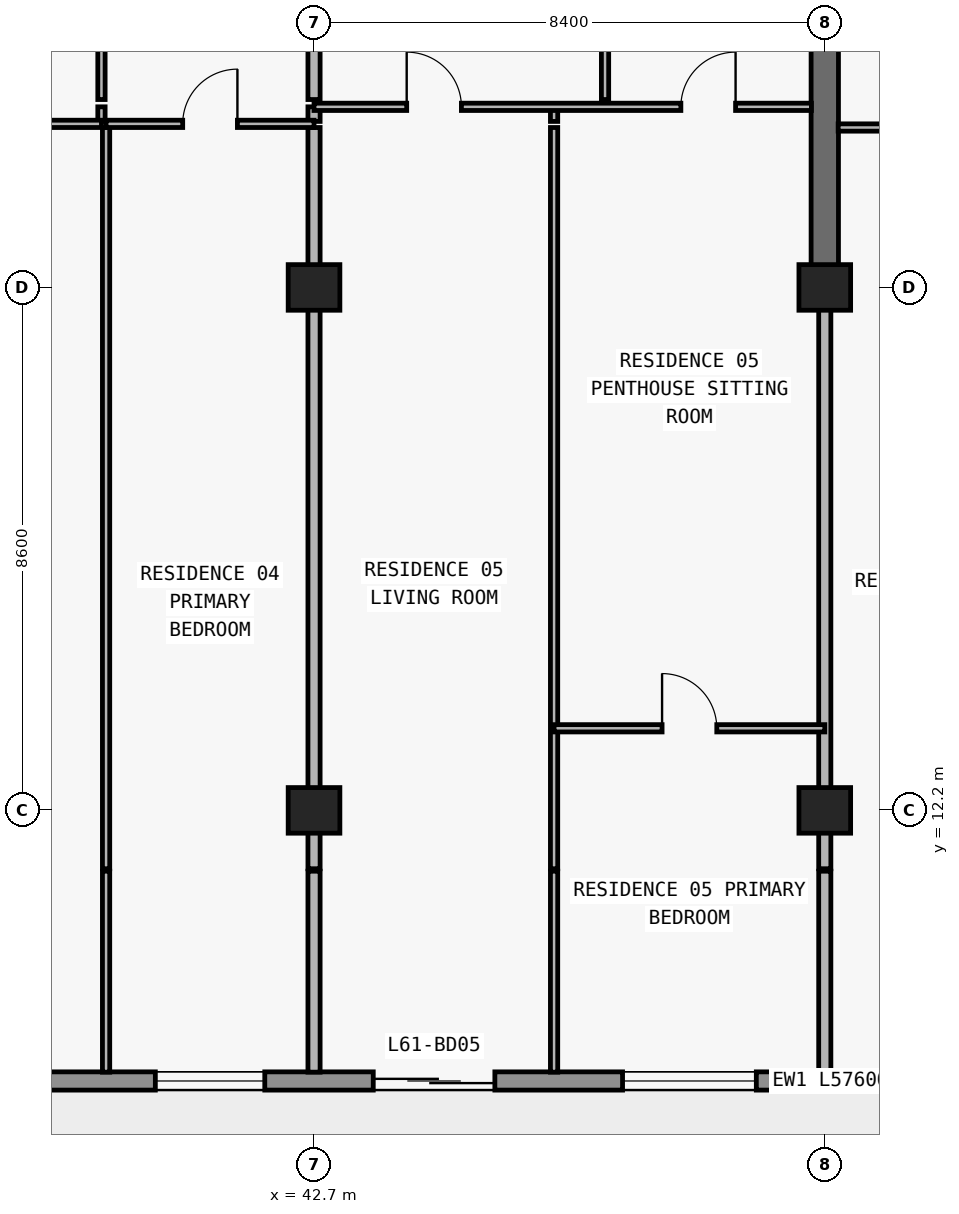
"""IFC4 building model, lengths in metres.
Left out: names, types, materials, properties, quantities, classifications, styles, units other than length and angle.
Written with IfcOpenShell. Run it as: python <this file> out.ifc"""

import sys

from ifc_helpers import new_model, si_unit, direction, frame, frame_2d, origin, origin_2d, place, context, subcontext, project, spatial, rectangle, extrude, element, fill, save


model = new_model("IFC4")
c1 = context("Model", 3, precision=1e-05, world=origin(), true_north=direction((0.0, 1.0)))
c2 = subcontext(c1, "Body", "Model", "MODEL_VIEW")
j1 = project(units=[si_unit("LENGTHUNIT", "METRE"), si_unit("PLANEANGLEUNIT", "RADIAN")], contexts=[c1])
p1 = place(None, origin())
s1 = spatial("IfcSite", under=j1, at=p1, CompositionType="ELEMENT")
p2 = place(p1, origin())
s2 = spatial("IfcBuilding", under=s1, at=p2, CompositionType="ELEMENT")
p3 = place(p2, frame((0.0, 0.0, 218.1)))
s3 = spatial("IfcBuildingStorey", under=s2, at=p3, CompositionType="ELEMENT", Elevation=218.1)
for number, where, z_axis, x_axis in (
    (1, (42.7, 12.2, 0.0), (0.0, 0.0, 1.0), (1.0, 0.0, 0.0)),
    (2, (51.1, 12.2, 0.0), (0.0, 0.0, 1.0), (1.0, 0.0, 0.0)),
    (3, (42.7, 20.8, 0.0), (0.0, 0.0, 1.0), (1.0, 0.0, 0.0)),
    (4, (51.1, 20.8, 0.0), (0.0, 0.0, 1.0), (1.0, 0.0, 0.0)),
):
    element("IfcColumn", number, at=place(p3, frame(where, z_axis=z_axis, x_axis=x_axis)), inside=s3, PredefinedType="COLUMN", context=c2, shape_type="SweptSolid", body=[
        extrude(rectangle(XDim=0.85, YDim=0.75, at=origin_2d()), origin(), (0.0, 0.0, 1.0), 3.0),
    ])
p4 = place(p3, frame((51.1, 20.8, 0.0), z_axis=(0.0, 0.0, 1.0), x_axis=(0.0, 1.0, 0.0)))
e5 = element("IfcWall", 5, at=p4, inside=s3, PredefinedType="SHEAR", context=c2, shape_type="SweptSolid", body=[
    extrude(rectangle(XDim=8.6, YDim=0.45, at=frame_2d((4.3, 0.0))), origin(), (0.0, 0.0, 1.0), 3.0),
])
p5 = place(p3, frame((67.7, 7.75, 0.0), z_axis=(0.0, 0.0, 1.0), x_axis=(-1.0, 0.0, 0.0)))
e6 = element("IfcWall", 6, at=p5, inside=s3, PredefinedType="STANDARD", context=c2, shape_type="SweptSolid", body=[
    extrude(rectangle(XDim=57.6, YDim=0.3, at=frame_2d((28.8, 0.0))), origin(), (0.0, 0.0, 1.0), 3.0),
])
p6 = place(p5, frame((54.673, 0.0, 0.0)))
e7 = element("IfcOpeningElement", 7, at=p6, cuts=e6, PredefinedType="OPENING", context=c2, shape_type="SweptSolid", body=[
    extrude(rectangle(XDim=2.0, YDim=2.3, at=frame_2d((1.0, 1.15))), frame((0.0, 0.16, 0.0), z_axis=(0.0, -1.0, 0.0), x_axis=(1.0, 0.0, 0.0)), (0.0, 0.0, 1.0), 0.32),
])
p7 = place(p5, frame((50.473, 0.0, 0.85)))
e8 = element("IfcOpeningElement", 8, at=p7, cuts=e6, PredefinedType="OPENING", context=c2, shape_type="SweptSolid", body=[
    extrude(rectangle(XDim=2.2, YDim=1.55, at=frame_2d((1.1, 0.775))), frame((0.0, 0.16, 0.0), z_axis=(0.0, -1.0, 0.0), x_axis=(1.0, 0.0, 0.0)), (0.0, 0.0, 1.0), 0.32),
])
p8 = place(p5, frame((46.09, 0.0, 0.0)))
e9 = element("IfcOpeningElement", 9, at=p8, cuts=e6, PredefinedType="OPENING", context=c2, shape_type="SweptSolid", body=[
    extrude(rectangle(XDim=2.0, YDim=2.3, at=frame_2d((1.0, 1.15))), frame((0.0, 0.16, 0.0), z_axis=(0.0, -1.0, 0.0), x_axis=(1.0, 0.0, 0.0)), (0.0, 0.0, 1.0), 0.32),
])
p9 = place(p5, frame((41.99, 0.0, 0.85)))
e10 = element("IfcOpeningElement", 10, at=p9, cuts=e6, PredefinedType="OPENING", context=c2, shape_type="SweptSolid", body=[
    extrude(rectangle(XDim=1.8, YDim=1.55, at=frame_2d((0.9, 0.775))), frame((0.0, 0.16, 0.0), z_axis=(0.0, -1.0, 0.0), x_axis=(1.0, 0.0, 0.0)), (0.0, 0.0, 1.0), 0.32),
])
p10 = place(p5, frame((38.026, 0.0, 0.0)))
e11 = element("IfcOpeningElement", 11, at=p10, cuts=e6, PredefinedType="OPENING", context=c2, shape_type="SweptSolid", body=[
    extrude(rectangle(XDim=2.0, YDim=2.3, at=frame_2d((1.0, 1.15))), frame((0.0, 0.16, 0.0), z_axis=(0.0, -1.0, 0.0), x_axis=(1.0, 0.0, 0.0)), (0.0, 0.0, 1.0), 0.32),
])
p11 = place(p5, frame((33.726, 0.0, 0.85)))
e12 = element("IfcOpeningElement", 12, at=p11, cuts=e6, PredefinedType="OPENING", context=c2, shape_type="SweptSolid", body=[
    extrude(rectangle(XDim=2.2, YDim=1.55, at=frame_2d((1.1, 0.775))), frame((0.0, 0.16, 0.0), z_axis=(0.0, -1.0, 0.0), x_axis=(1.0, 0.0, 0.0)), (0.0, 0.0, 1.0), 0.32),
])
p12 = place(p5, frame((29.51, 0.0, 0.0)))
e13 = element("IfcOpeningElement", 13, at=p12, cuts=e6, PredefinedType="OPENING", context=c2, shape_type="SweptSolid", body=[
    extrude(rectangle(XDim=2.0, YDim=2.3, at=frame_2d((1.0, 1.15))), frame((0.0, 0.16, 0.0), z_axis=(0.0, -1.0, 0.0), x_axis=(1.0, 0.0, 0.0)), (0.0, 0.0, 1.0), 0.32),
])
p13 = place(p5, frame((25.81, 0.0, 0.85)))
e14 = element("IfcOpeningElement", 14, at=p13, cuts=e6, PredefinedType="OPENING", context=c2, shape_type="SweptSolid", body=[
    extrude(rectangle(XDim=1.8, YDim=1.55, at=frame_2d((0.9, 0.775))), frame((0.0, 0.16, 0.0), z_axis=(0.0, -1.0, 0.0), x_axis=(1.0, 0.0, 0.0)), (0.0, 0.0, 1.0), 0.32),
])
p14 = place(p5, frame((22.026, 0.0, 0.0)))
e15 = element("IfcOpeningElement", 15, at=p14, cuts=e6, PredefinedType="OPENING", context=c2, shape_type="SweptSolid", body=[
    extrude(rectangle(XDim=2.0, YDim=2.3, at=frame_2d((1.0, 1.15))), frame((0.0, 0.16, 0.0), z_axis=(0.0, -1.0, 0.0), x_axis=(1.0, 0.0, 0.0)), (0.0, 0.0, 1.0), 0.32),
])
p15 = place(p5, frame((17.726, 0.0, 0.85)))
e16 = element("IfcOpeningElement", 16, at=p15, cuts=e6, PredefinedType="OPENING", context=c2, shape_type="SweptSolid", body=[
    extrude(rectangle(XDim=2.2, YDim=1.55, at=frame_2d((1.1, 0.775))), frame((0.0, 0.16, 0.0), z_axis=(0.0, -1.0, 0.0), x_axis=(1.0, 0.0, 0.0)), (0.0, 0.0, 1.0), 0.32),
])
p16 = place(p5, frame((13.29, 0.0, 0.0)))
e17 = element("IfcOpeningElement", 17, at=p16, cuts=e6, PredefinedType="OPENING", context=c2, shape_type="SweptSolid", body=[
    extrude(rectangle(XDim=2.0, YDim=2.3, at=frame_2d((1.0, 1.15))), frame((0.0, 0.16, 0.0), z_axis=(0.0, -1.0, 0.0), x_axis=(1.0, 0.0, 0.0)), (0.0, 0.0, 1.0), 0.32),
])
p17 = place(p5, frame((9.19, 0.0, 0.85)))
e18 = element("IfcOpeningElement", 18, at=p17, cuts=e6, PredefinedType="OPENING", context=c2, shape_type="SweptSolid", body=[
    extrude(rectangle(XDim=1.8, YDim=1.55, at=frame_2d((0.9, 0.775))), frame((0.0, 0.16, 0.0), z_axis=(0.0, -1.0, 0.0), x_axis=(1.0, 0.0, 0.0)), (0.0, 0.0, 1.0), 0.32),
])
p18 = place(p5, frame((5.273, 0.0, 0.0)))
e19 = element("IfcOpeningElement", 19, at=p18, cuts=e6, PredefinedType="OPENING", context=c2, shape_type="SweptSolid", body=[
    extrude(rectangle(XDim=2.0, YDim=2.3, at=frame_2d((1.0, 1.15))), frame((0.0, 0.16, 0.0), z_axis=(0.0, -1.0, 0.0), x_axis=(1.0, 0.0, 0.0)), (0.0, 0.0, 1.0), 0.32),
])
p19 = place(p5, frame((1.073, 0.0, 0.85)))
e20 = element("IfcOpeningElement", 20, at=p19, cuts=e6, PredefinedType="OPENING", context=c2, shape_type="SweptSolid", body=[
    extrude(rectangle(XDim=2.2, YDim=1.55, at=frame_2d((1.1, 0.775))), frame((0.0, 0.16, 0.0), z_axis=(0.0, -1.0, 0.0), x_axis=(1.0, 0.0, 0.0)), (0.0, 0.0, 1.0), 0.32),
])
p20 = place(p3, frame((39.204, 23.53, 0.0), z_axis=(0.0, 0.0, 1.0), x_axis=(0.0, 1.0, 0.0)))
e21 = element("IfcWall", 21, at=p20, inside=s3, PredefinedType="PARTITIONING", context=c2, shape_type="SweptSolid", body=[
    extrude(rectangle(XDim=0.24, YDim=0.12, at=frame_2d((0.12, 0.0))), origin(), (0.0, 0.0, 1.0), 3.0),
])
p21 = place(p3, frame((39.204, 23.89, 0.0), z_axis=(0.0, 0.0, 1.0), x_axis=(0.0, 1.0, 0.0)))
e22 = element("IfcWall", 22, at=p21, inside=s3, PredefinedType="PARTITIONING", context=c2, shape_type="SweptSolid", body=[
    extrude(rectangle(XDim=4.69, YDim=0.12, at=frame_2d((2.345, 0.0))), origin(), (0.0, 0.0, 1.0), 3.0),
])
p22 = place(p21, frame((1.895, 0.0, 0.0)))
e23 = element("IfcOpeningElement", 23, at=p22, cuts=e22, PredefinedType="OPENING", context=c2, shape_type="SweptSolid", body=[
    extrude(rectangle(XDim=0.9, YDim=2.15, at=frame_2d((0.45, 1.075))), frame((0.0, 0.07, 0.0), z_axis=(0.0, -1.0, 0.0), x_axis=(1.0, 0.0, 0.0)), (0.0, 0.0, 1.0), 0.14),
])
p23 = place(p3, frame((39.28, 7.895, 0.0), z_axis=(0.0, 0.0, 1.0), x_axis=(0.0, 1.0, 0.0)))
e24 = element("IfcWall", 24, at=p23, inside=s3, PredefinedType="PARTITIONING", context=c2, shape_type="SweptSolid", body=[
    extrude(rectangle(XDim=3.305, YDim=0.12, at=frame_2d((1.652, 0.0))), origin(), (0.0, 0.0, 1.0), 3.0),
])
p24 = place(p3, frame((39.28, 11.24, 0.0), z_axis=(0.0, 0.0, 1.0), x_axis=(0.0, 1.0, 0.0)))
e25 = element("IfcWall", 25, at=p24, inside=s3, PredefinedType="PARTITIONING", context=c2, shape_type="SweptSolid", body=[
    extrude(rectangle(XDim=12.19, YDim=0.12, at=frame_2d((6.095, 0.0))), origin(), (0.0, 0.0, 1.0), 3.0),
])
p25 = place(p3, frame((42.7, 7.895, 0.0), z_axis=(0.0, 0.0, 1.0), x_axis=(0.0, 1.0, 0.0)))
e26 = element("IfcWall", 26, at=p25, inside=s3, PredefinedType="PARTITIONING", context=c2, shape_type="SweptSolid", body=[
    extrude(rectangle(XDim=3.305, YDim=0.2, at=frame_2d((1.652, 0.0))), origin(), (0.0, 0.0, 1.0), 3.0),
])
p26 = place(p3, frame((42.7, 11.24, 0.0), z_axis=(0.0, 0.0, 1.0), x_axis=(0.0, 1.0, 0.0)))
e27 = element("IfcWall", 27, at=p26, inside=s3, PredefinedType="PARTITIONING", context=c2, shape_type="SweptSolid", body=[
    extrude(rectangle(XDim=12.19, YDim=0.2, at=frame_2d((6.095, 0.0))), origin(), (0.0, 0.0, 1.0), 2.213),
])
p27 = place(p3, frame((42.7, 23.53, 0.0), z_axis=(0.0, 0.0, 1.0), x_axis=(0.0, 1.0, 0.0)))
e28 = element("IfcWall", 28, at=p27, inside=s3, PredefinedType="PARTITIONING", context=c2, shape_type="SweptSolid", body=[
    extrude(rectangle(XDim=0.24, YDim=0.2, at=frame_2d((0.12, 0.0))), origin(), (0.0, 0.0, 1.0), 2.213),
])
p28 = place(p3, frame((42.7, 23.89, 0.0), z_axis=(0.0, 0.0, 1.0), x_axis=(0.0, 1.0, 0.0)))
e29 = element("IfcWall", 29, at=p28, inside=s3, PredefinedType="PARTITIONING", context=c2, shape_type="SweptSolid", body=[
    extrude(rectangle(XDim=4.69, YDim=0.2, at=frame_2d((2.345, 0.0))), origin(), (0.0, 0.0, 1.0), 2.213),
])
p29 = place(p3, frame((46.648, 7.895, 0.0), z_axis=(0.0, 0.0, 1.0), x_axis=(0.0, 1.0, 0.0)))
e30 = element("IfcWall", 30, at=p29, inside=s3, PredefinedType="PARTITIONING", context=c2, shape_type="SweptSolid", body=[
    extrude(rectangle(XDim=3.305, YDim=0.12, at=frame_2d((1.652, 0.0))), origin(), (0.0, 0.0, 1.0), 3.0),
])
p30 = place(p3, frame((46.648, 11.24, 0.0), z_axis=(0.0, 0.0, 1.0), x_axis=(0.0, 1.0, 0.0)))
e31 = element("IfcWall", 31, at=p30, inside=s3, PredefinedType="PARTITIONING", context=c2, shape_type="SweptSolid", body=[
    extrude(rectangle(XDim=12.19, YDim=0.12, at=frame_2d((6.095, 0.0))), origin(), (0.0, 0.0, 1.0), 3.0),
])
p31 = place(p3, frame((46.648, 23.53, 0.0), z_axis=(0.0, 0.0, 1.0), x_axis=(0.0, 1.0, 0.0)))
e32 = element("IfcWall", 32, at=p31, inside=s3, PredefinedType="PARTITIONING", context=c2, shape_type="SweptSolid", body=[
    extrude(rectangle(XDim=0.24, YDim=0.12, at=frame_2d((0.12, 0.0))), origin(), (0.0, 0.0, 1.0), 3.0),
])
p32 = place(p3, frame((47.486, 23.89, 0.0), z_axis=(0.0, 0.0, 1.0), x_axis=(0.0, 1.0, 0.0)))
e33 = element("IfcWall", 33, at=p32, inside=s3, PredefinedType="PARTITIONING", context=c2, shape_type="SweptSolid", body=[
    extrude(rectangle(XDim=4.69, YDim=0.12, at=frame_2d((2.345, 0.0))), origin(), (0.0, 0.0, 1.0), 3.0),
])
p33 = place(p32, frame((1.895, 0.0, 0.0)))
e34 = element("IfcOpeningElement", 34, at=p33, cuts=e33, PredefinedType="OPENING", context=c2, shape_type="SweptSolid", body=[
    extrude(rectangle(XDim=0.9, YDim=2.15, at=frame_2d((0.45, 1.075))), frame((0.0, 0.07, 0.0), z_axis=(0.0, -1.0, 0.0), x_axis=(1.0, 0.0, 0.0)), (0.0, 0.0, 1.0), 0.14),
])
p34 = place(p3, frame((51.1, 7.895, 0.0), z_axis=(0.0, 0.0, 1.0), x_axis=(0.0, 1.0, 0.0)))
e35 = element("IfcWall", 35, at=p34, inside=s3, PredefinedType="PARTITIONING", context=c2, shape_type="SweptSolid", body=[
    extrude(rectangle(XDim=3.305, YDim=0.2, at=frame_2d((1.652, 0.0))), origin(), (0.0, 0.0, 1.0), 3.0),
])
p35 = place(p3, frame((51.1, 11.24, 0.0), z_axis=(0.0, 0.0, 1.0), x_axis=(0.0, 1.0, 0.0)))
e36 = element("IfcWall", 36, at=p35, inside=s3, PredefinedType="PARTITIONING", context=c2, shape_type="SweptSolid", body=[
    extrude(rectangle(XDim=9.555, YDim=0.2, at=frame_2d((4.777, 0.0))), origin(), (0.0, 0.0, 1.0), 2.213),
])
p36 = place(p3, frame((46.648, 13.55, 0.0), z_axis=(0.0, 0.0, 1.0), x_axis=(1.0, 0.0, 0.0)))
e37 = element("IfcWall", 37, at=p36, inside=s3, PredefinedType="PARTITIONING", context=c2, shape_type="SweptSolid", body=[
    extrude(rectangle(XDim=4.452, YDim=0.12, at=frame_2d((2.226, 0.0))), origin(), (0.0, 0.0, 1.0), 3.0),
])
p37 = place(p36, frame((1.776, 0.0, 0.0)))
e38 = element("IfcOpeningElement", 38, at=p37, cuts=e37, PredefinedType="OPENING", context=c2, shape_type="SweptSolid", body=[
    extrude(rectangle(XDim=0.9, YDim=2.15, at=frame_2d((0.45, 1.075))), frame((0.0, 0.07, 0.0), z_axis=(0.0, -1.0, 0.0), x_axis=(1.0, 0.0, 0.0)), (0.0, 0.0, 1.0), 0.14),
])
p38 = place(p3, frame((51.32, 23.43, 0.0), z_axis=(0.0, 0.0, 1.0), x_axis=(1.0, 0.0, 0.0)))
e39 = element("IfcWall", 39, at=p38, inside=s3, PredefinedType="PARTITIONING", context=c2, shape_type="SweptSolid", body=[
    extrude(rectangle(XDim=8.18, YDim=0.12, at=frame_2d((4.09, 0.0))), origin(), (0.0, 0.0, 1.0), 3.0),
])
p39 = place(p38, frame((1.583, 0.0, 0.0)))
e40 = element("IfcOpeningElement", 40, at=p39, cuts=e39, PredefinedType="OPENING", context=c2, shape_type="SweptSolid", body=[
    extrude(rectangle(XDim=0.9, YDim=2.15, at=frame_2d((0.45, 1.075))), frame((0.0, 0.07, 0.0), z_axis=(0.0, -1.0, 0.0), x_axis=(1.0, 0.0, 0.0)), (0.0, 0.0, 1.0), 0.14),
])
p40 = place(p38, frame((5.84, 0.0, 0.0)))
e41 = element("IfcOpeningElement", 41, at=p40, cuts=e39, PredefinedType="OPENING", context=c2, shape_type="SweptSolid", body=[
    extrude(rectangle(XDim=0.9, YDim=2.15, at=frame_2d((0.45, 1.075))), frame((0.0, 0.07, 0.0), z_axis=(0.0, -1.0, 0.0), x_axis=(1.0, 0.0, 0.0)), (0.0, 0.0, 1.0), 0.14),
])
p41 = place(p3, frame((35.1, 23.49, 0.0), z_axis=(0.0, 0.0, 1.0), x_axis=(1.0, 0.0, 0.0)))
e42 = element("IfcWall", 42, at=p41, inside=s3, PredefinedType="PARTITIONING", context=c2, shape_type="SweptSolid", body=[
    extrude(rectangle(XDim=4.104, YDim=0.12, at=frame_2d((2.052, 0.0))), origin(), (0.0, 0.0, 1.0), 3.0),
])
p42 = place(p41, frame((1.602, 0.0, 0.0)))
e43 = element("IfcOpeningElement", 43, at=p42, cuts=e42, PredefinedType="OPENING", context=c2, shape_type="SweptSolid", body=[
    extrude(rectangle(XDim=0.9, YDim=2.15, at=frame_2d((0.45, 1.075))), frame((0.0, 0.07, 0.0), z_axis=(0.0, -1.0, 0.0), x_axis=(1.0, 0.0, 0.0)), (0.0, 0.0, 1.0), 0.14),
])
p43 = place(p3, frame((39.28, 23.49, 0.0), z_axis=(0.0, 0.0, 1.0), x_axis=(1.0, 0.0, 0.0)))
e44 = element("IfcWall", 44, at=p43, inside=s3, PredefinedType="PARTITIONING", context=c2, shape_type="SweptSolid", body=[
    extrude(rectangle(XDim=3.42, YDim=0.12, at=frame_2d((1.71, 0.0))), origin(), (0.0, 0.0, 1.0), 3.0),
])
p44 = place(p43, frame((1.26, 0.0, 0.0)))
e45 = element("IfcOpeningElement", 45, at=p44, cuts=e44, PredefinedType="OPENING", context=c2, shape_type="SweptSolid", body=[
    extrude(rectangle(XDim=0.9, YDim=2.15, at=frame_2d((0.45, 1.075))), frame((0.0, 0.07, 0.0), z_axis=(0.0, -1.0, 0.0), x_axis=(1.0, 0.0, 0.0)), (0.0, 0.0, 1.0), 0.14),
])
p45 = place(p3, frame((42.7, 23.77, 0.0), z_axis=(0.0, 0.0, 1.0), x_axis=(1.0, 0.0, 0.0)))
e46 = element("IfcWall", 46, at=p45, inside=s3, PredefinedType="PARTITIONING", context=c2, shape_type="SweptSolid", body=[
    extrude(rectangle(XDim=8.18, YDim=0.12, at=frame_2d((4.09, 0.0))), origin(), (0.0, 0.0, 1.0), 3.0),
])
p46 = place(p45, frame((1.524, 0.0, 0.0)))
e47 = element("IfcOpeningElement", 47, at=p46, cuts=e46, PredefinedType="OPENING", context=c2, shape_type="SweptSolid", body=[
    extrude(rectangle(XDim=0.9, YDim=2.15, at=frame_2d((0.45, 1.075))), frame((0.0, 0.07, 0.0), z_axis=(0.0, -1.0, 0.0), x_axis=(1.0, 0.0, 0.0)), (0.0, 0.0, 1.0), 0.14),
])
p47 = place(p45, frame((6.033, 0.0, 0.0)))
e48 = element("IfcOpeningElement", 48, at=p47, cuts=e46, PredefinedType="OPENING", context=c2, shape_type="SweptSolid", body=[
    extrude(rectangle(XDim=0.9, YDim=2.15, at=frame_2d((0.45, 1.075))), frame((0.0, 0.07, 0.0), z_axis=(0.0, -1.0, 0.0), x_axis=(1.0, 0.0, 0.0)), (0.0, 0.0, 1.0), 0.14),
])
p48 = place(p13, origin())
e49 = element("IfcWindow", 49, at=p48, inside=s3, PartitioningType="SINGLE_PANEL", PredefinedType="WINDOW", context=c2, shape_type="SweptSolid", body=[
    extrude(rectangle(XDim=1.8, YDim=1.55, at=frame_2d((0.9, 0.775))), frame((0.0, 0.03, 0.0), z_axis=(0.0, -1.0, 0.0), x_axis=(1.0, 0.0, 0.0)), (0.0, 0.0, 1.0), 0.06),
])
fill(e14, e49)
p49 = place(p14, origin())
e50 = element("IfcDoor", 50, at=p49, inside=s3, OperationType="DOUBLE_DOOR_SLIDING", PredefinedType="DOOR", context=c2, shape_type="SweptSolid", body=[
    extrude(rectangle(XDim=2.0, YDim=2.3, at=frame_2d((1.0, 1.15))), frame((0.0, 0.025, 0.0), z_axis=(0.0, -1.0, 0.0), x_axis=(1.0, 0.0, 0.0)), (0.0, 0.0, 1.0), 0.05),
])
fill(e15, e50)
p50 = place(p15, origin())
e51 = element("IfcWindow", 51, at=p50, inside=s3, PartitioningType="SINGLE_PANEL", PredefinedType="WINDOW", context=c2, shape_type="SweptSolid", body=[
    extrude(rectangle(XDim=2.2, YDim=1.55, at=frame_2d((1.1, 0.775))), frame((0.0, 0.03, 0.0), z_axis=(0.0, -1.0, 0.0), x_axis=(1.0, 0.0, 0.0)), (0.0, 0.0, 1.0), 0.06),
])
fill(e16, e51)
p51 = place(p44, origin())
e52 = element("IfcDoor", 52, at=p51, inside=s3, OperationType="SINGLE_SWING_RIGHT", PredefinedType="DOOR", context=c2, shape_type="SweptSolid", body=[
    extrude(rectangle(XDim=0.9, YDim=2.15, at=frame_2d((0.45, 1.075))), frame((0.0, 0.025, 0.0), z_axis=(0.0, -1.0, 0.0), x_axis=(1.0, 0.0, 0.0)), (0.0, 0.0, 1.0), 0.05),
])
fill(e45, e52)
p52 = place(p46, origin())
e53 = element("IfcDoor", 53, at=p52, inside=s3, OperationType="SINGLE_SWING_LEFT", PredefinedType="DOOR", context=c2, shape_type="SweptSolid", body=[
    extrude(rectangle(XDim=0.9, YDim=2.15, at=frame_2d((0.45, 1.075))), frame((0.0, 0.025, 0.0), z_axis=(0.0, -1.0, 0.0), x_axis=(1.0, 0.0, 0.0)), (0.0, 0.0, 1.0), 0.05),
])
fill(e47, e53)
p53 = place(p47, origin())
e54 = element("IfcDoor", 54, at=p53, inside=s3, OperationType="SINGLE_SWING_RIGHT", PredefinedType="DOOR", context=c2, shape_type="SweptSolid", body=[
    extrude(rectangle(XDim=0.9, YDim=2.15, at=frame_2d((0.45, 1.075))), frame((0.0, 0.025, 0.0), z_axis=(0.0, -1.0, 0.0), x_axis=(1.0, 0.0, 0.0)), (0.0, 0.0, 1.0), 0.05),
])
fill(e48, e54)
p54 = place(p37, origin())
e55 = element("IfcDoor", 55, at=p54, inside=s3, OperationType="SINGLE_SWING_LEFT", PredefinedType="DOOR", context=c2, shape_type="SweptSolid", body=[
    extrude(rectangle(XDim=0.9, YDim=2.15, at=frame_2d((0.45, 1.075))), frame((0.0, 0.025, 0.0), z_axis=(0.0, -1.0, 0.0), x_axis=(1.0, 0.0, 0.0)), (0.0, 0.0, 1.0), 0.05),
])
fill(e38, e55)
save(model, sys.argv[1])
